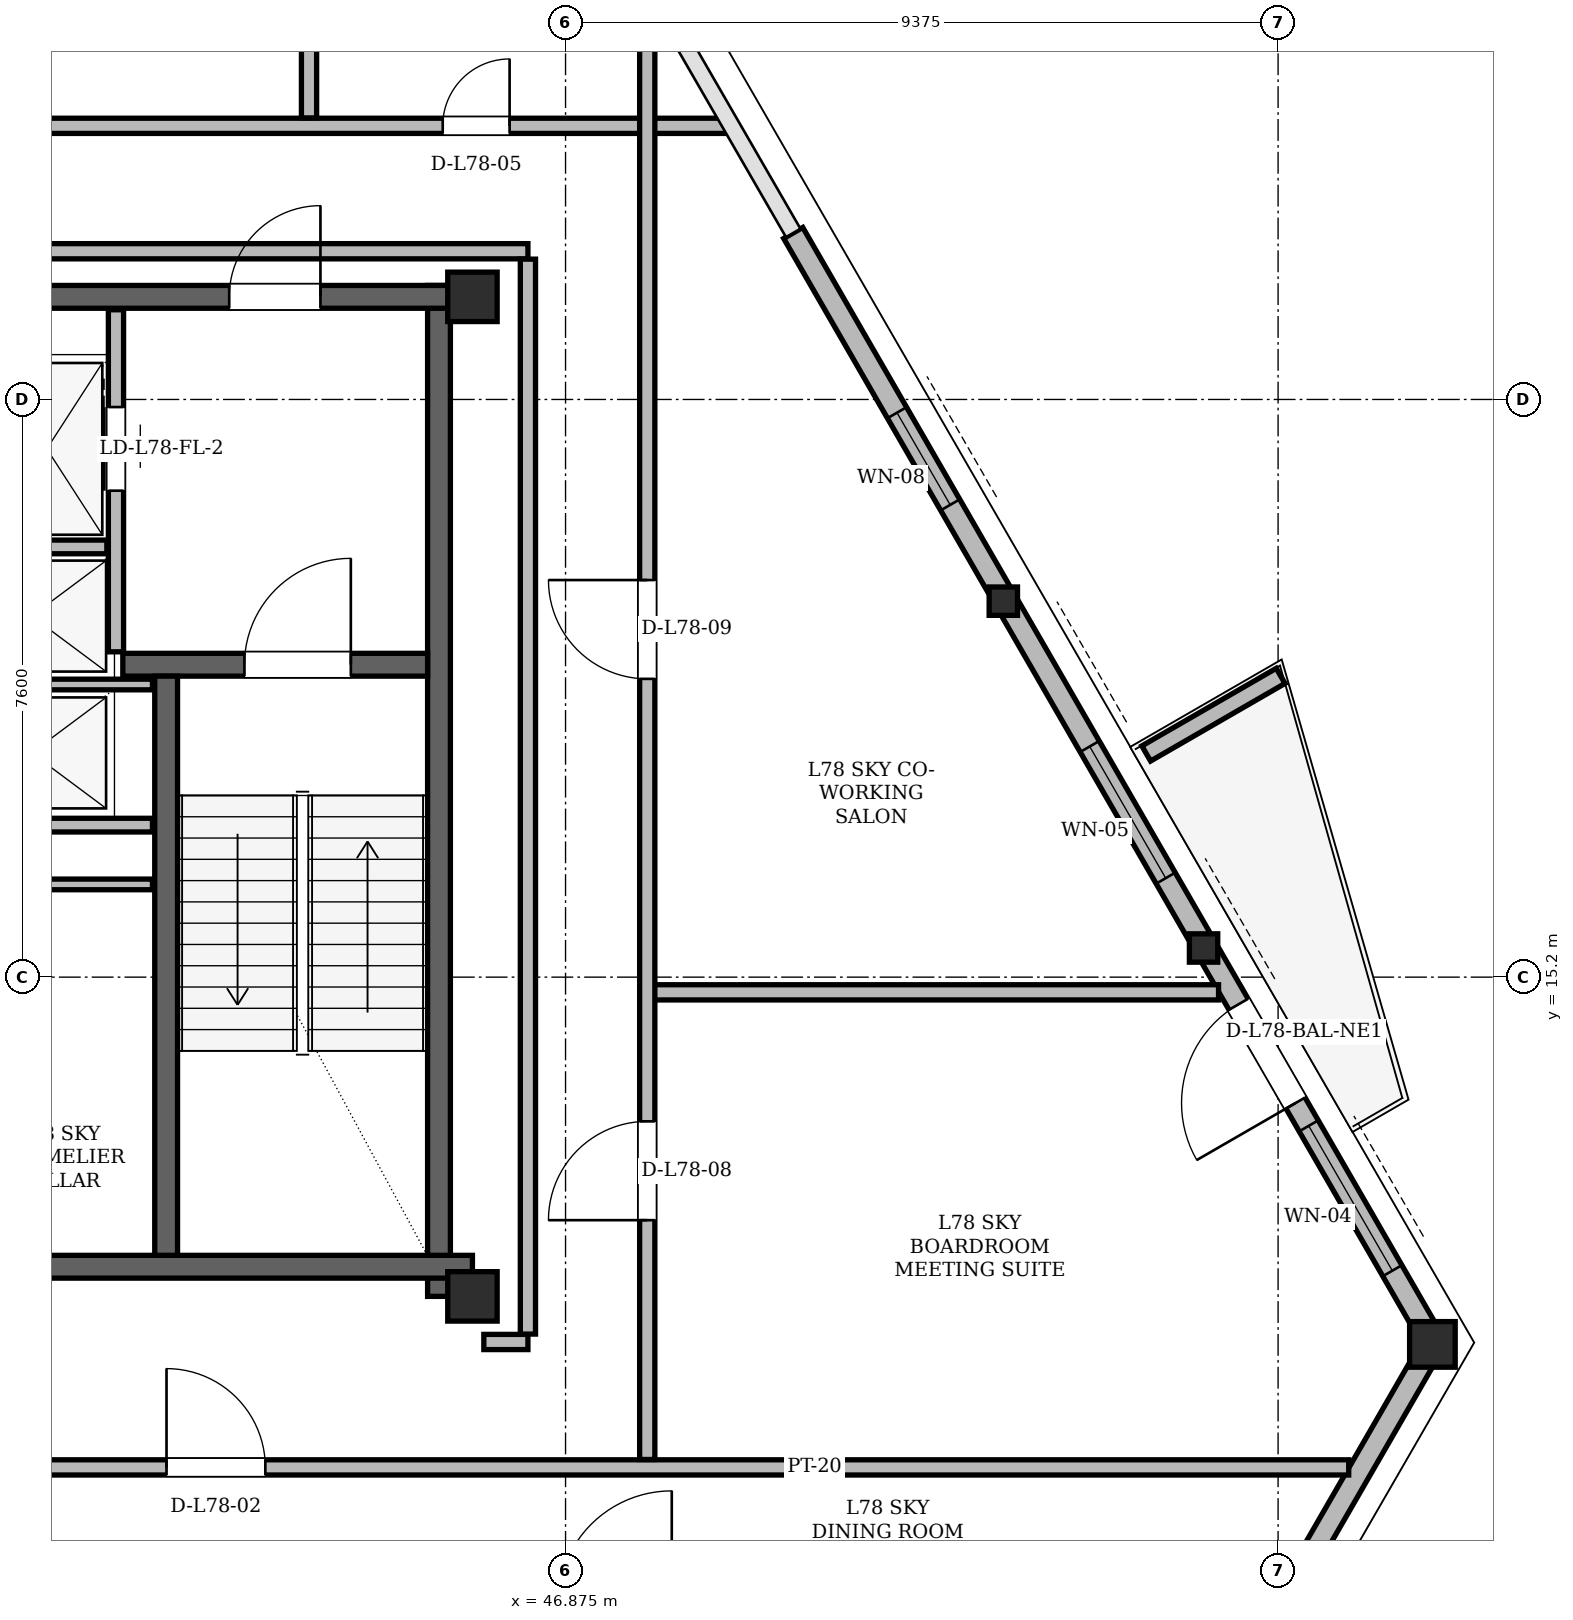
"""IFC4 building model, lengths in metres.
Left out: names, types, materials, properties, quantities, classifications, styles, units other than length and angle.
Written with IfcOpenShell. Run it as: python <this file> out.ifc"""

import sys

from ifc_helpers import new_model, si_unit, direction, frame, frame_2d, origin, origin_2d, place, context, subcontext, project, spatial, polyline, rectangle, hollow_rectangle, i_section, outline, extrude, element, fill, save


model = new_model("IFC4")
c1 = context("Model", 3, precision=1e-05, world=origin(), true_north=direction((0.0, 1.0)))
c2 = subcontext(c1, "Body", "Model", "MODEL_VIEW")
j1 = project(units=[si_unit("LENGTHUNIT", "METRE"), si_unit("PLANEANGLEUNIT", "RADIAN")], contexts=[c1])
p1 = place(None, origin())
s1 = spatial("IfcSite", under=j1, at=p1, CompositionType="ELEMENT")
p2 = place(p1, origin())
s2 = spatial("IfcBuilding", under=s1, at=p2, CompositionType="ELEMENT")
p3 = place(p2, frame((0.0, 0.0, 296.7)))
s3 = spatial("IfcBuildingStorey", under=s2, at=p3, CompositionType="ELEMENT", Elevation=296.7)
for number, where, z_axis, x_axis in (
    (1, (45.65, 11.0, 0.0), (0.0, 0.0, 1.0), (1.0, 0.0, 0.0)),
    (2, (45.65, 24.15, 0.0), (0.0, 0.0, 1.0), (1.0, 0.0, 0.0)),
):
    element("IfcColumn", number, at=place(p3, frame(where, z_axis=z_axis, x_axis=x_axis)), inside=s3, PredefinedType="COLUMN", context=c2, shape_type="SweptSolid", body=[
        extrude(hollow_rectangle(XDim=0.65, YDim=0.65, WallThickness=0.05, at=origin_2d()), origin(), (0.0, 0.0, 1.0), 4.5),
    ])
p4 = place(p3, frame((58.299, 10.392, 0.005), z_axis=(-0.008479798561, -0.010436675152, 0.999909580326), x_axis=(0.776114000116, -0.630592625094, 0.0)))
e3 = element("IfcColumn", 3, at=p4, inside=s3, PredefinedType="COLUMN", context=c2, shape_type="SweptSolid", body=[
    extrude(hollow_rectangle(XDim=0.6, YDim=0.6, WallThickness=0.045, at=origin_2d()), origin(), (0.0, 0.0, 1.0), 4.491),
])
p5 = place(p3, frame((55.29, 15.604, 0.005), z_axis=(-0.009186508362, -0.009132150324, 0.999916102428), x_axis=(0.705005437623, -0.709201898561, 0.0)))
e4 = element("IfcColumn", 4, at=p5, inside=s3, PredefinedType="COLUMN", context=c2, shape_type="SweptSolid", body=[
    extrude(i_section(OverallWidth=0.373, OverallDepth=0.373, WebThickness=0.016, FlangeThickness=0.026, at=origin_2d()), origin(), (0.0, 0.0, 1.0), 4.491),
])
p6 = place(p3, frame((52.657, 20.164, 0.005), z_axis=(-0.009893197126, -0.007936300991, 0.999919566654), x_axis=(0.625739826637, -0.780031838684, 0.0)))
e5 = element("IfcColumn", 5, at=p6, inside=s3, PredefinedType="COLUMN", context=c2, shape_type="SweptSolid", body=[
    extrude(i_section(OverallWidth=0.373, OverallDepth=0.373, WebThickness=0.016, FlangeThickness=0.026, at=origin_2d()), origin(), (0.0, 0.0, 1.0), 4.491),
])
p7 = place(p3, frame((45.21, 11.0, 0.0), z_axis=(0.0, 0.0, 1.0), x_axis=(0.0, 1.0, 0.0)))
e6 = element("IfcWall", 6, at=p7, inside=s3, PredefinedType="SHEAR", context=c2, shape_type="SweptSolid", body=[
    extrude(rectangle(XDim=13.3, YDim=0.3, at=frame_2d((6.65, 0.0))), origin(), (0.0, 0.0, 1.0), 4.28),
])
p8 = place(p3, frame((38.55, 11.39, 0.0), z_axis=(0.0, 0.0, 1.0), x_axis=(1.0, 0.0, 0.0)))
e7 = element("IfcWall", 7, at=p8, inside=s3, PredefinedType="SHEAR", context=c2, shape_type="SweptSolid", body=[
    extrude(rectangle(XDim=7.1, YDim=0.3, at=frame_2d((3.55, 0.0))), origin(), (0.0, 0.0, 1.0), 4.28),
])
p9 = place(p3, frame((29.65, 24.15, 0.0), z_axis=(0.0, 0.0, 1.0), x_axis=(1.0, 0.0, 0.0)))
e8 = element("IfcWall", 8, at=p9, inside=s3, PredefinedType="SHEAR", context=c2, shape_type="SweptSolid", body=[
    extrude(rectangle(XDim=15.7, YDim=0.3, at=frame_2d((7.85, 0.0))), origin(), (0.0, 0.0, 1.0), 4.28),
])
p10 = place(p9, frame((1.7, 0.0, 0.0)))
e9 = element("IfcOpeningElement", 9, at=p10, cuts=e8, PredefinedType="OPENING", context=c2, shape_type="SweptSolid", body=[
    extrude(rectangle(XDim=1.2, YDim=2.2, at=frame_2d((0.6, 1.1))), frame((0.0, 0.15, 0.0), z_axis=(0.0, -1.0, 0.0), x_axis=(1.0, 0.0, 0.0)), (0.0, 0.0, 1.0), 0.3),
])
p11 = place(p9, frame((12.8, 0.0, 0.0)))
e10 = element("IfcOpeningElement", 10, at=p11, cuts=e8, PredefinedType="OPENING", context=c2, shape_type="SweptSolid", body=[
    extrude(rectangle(XDim=1.2, YDim=2.2, at=frame_2d((0.6, 1.1))), frame((0.0, 0.15, 0.0), z_axis=(0.0, -1.0, 0.0), x_axis=(1.0, 0.0, 0.0)), (0.0, 0.0, 1.0), 0.3),
])
p12 = place(p9, frame((7.4, 0.0, 0.0)))
e11 = element("IfcOpeningElement", 11, at=p12, cuts=e8, PredefinedType="OPENING", context=c2, shape_type="SweptSolid", body=[
    extrude(rectangle(XDim=0.9, YDim=2.05, at=frame_2d((0.45, 1.025))), frame((0.0, 0.15, 0.0), z_axis=(0.0, -1.0, 0.0), x_axis=(1.0, 0.0, 0.0)), (0.0, 0.0, 1.0), 0.3),
])
p13 = place(p3, frame((41.05, 19.31, 0.0), z_axis=(0.0, 0.0, 1.0), x_axis=(1.0, 0.0, 0.0)))
e12 = element("IfcWall", 12, at=p13, inside=s3, PredefinedType="SHEAR", context=c2, shape_type="SweptSolid", body=[
    extrude(rectangle(XDim=4.01, YDim=0.3, at=frame_2d((2.005, 0.0))), origin(), (0.0, 0.0, 1.0), 4.28),
])
p14 = place(p13, frame((1.6, 0.0, 0.0)))
e13 = element("IfcOpeningElement", 13, at=p14, cuts=e12, PredefinedType="OPENING", context=c2, shape_type="SweptSolid", body=[
    extrude(rectangle(XDim=1.4, YDim=2.2, at=frame_2d((0.7, 1.1))), frame((0.0, 0.15, 0.0), z_axis=(0.0, -1.0, 0.0), x_axis=(1.0, 0.0, 0.0)), (0.0, 0.0, 1.0), 0.3),
])
p15 = place(p3, frame((41.62, 11.54, 0.0), z_axis=(0.0, 0.0, 1.0), x_axis=(0.0, 1.0, 0.0)))
e14 = element("IfcWall", 14, at=p15, inside=s3, PredefinedType="SHEAR", context=c2, shape_type="SweptSolid", body=[
    extrude(rectangle(XDim=7.62, YDim=0.3, at=frame_2d((3.81, 0.0))), origin(), (0.0, 0.0, 1.0), 4.28),
])
p16 = place(p3, frame((56.307, 6.941, 0.0), z_axis=(0.0, 0.0, 1.0), x_axis=(0.500014184414, 0.866017214255, 0.0)))
e15 = element("IfcWall", 15, at=p16, inside=s3, PredefinedType="SOLIDWALL", context=c2, shape_type="SweptSolid", body=[
    extrude(rectangle(XDim=3.984, YDim=0.29, at=frame_2d((1.992, 0.0))), origin(), (0.0, 0.0, 1.0), 3.658),
])
p17 = place(p3, frame((58.299, 10.392, 0.0), z_axis=(0.0, 0.0, 1.0), x_axis=(-0.500008291124, 0.866020616849, 0.0)))
e16 = element("IfcWall", 16, at=p17, inside=s3, PredefinedType="SOLIDWALL", context=c2, shape_type="SweptSolid", body=[
    extrude(rectangle(XDim=16.857, YDim=0.29, at=frame_2d((8.429, 0.0))), origin(), (0.0, 0.0, 1.0), 3.658),
])
p18 = place(p17, frame((3.639, 0.0, 0.0)))
e17 = element("IfcOpeningElement", 17, at=p18, cuts=e16, PredefinedType="OPENING", context=c2, shape_type="SweptSolid", body=[
    extrude(rectangle(XDim=1.5, YDim=2.2, at=frame_2d((0.75, 1.1))), frame((0.0, 0.145, 0.0), z_axis=(0.0, -1.0, 0.0), x_axis=(1.0, 0.0, 0.0)), (0.0, 0.0, 1.0), 0.29),
])
p19 = place(p17, frame((1.093, 0.0, 0.85)))
e18 = element("IfcOpeningElement", 18, at=p19, cuts=e16, PredefinedType="OPENING", context=c2, shape_type="SweptSolid", body=[
    extrude(rectangle(XDim=2.2, YDim=1.85, at=frame_2d((1.1, 0.925))), frame((0.0, 0.145, 0.0), z_axis=(0.0, -1.0, 0.0), x_axis=(1.0, 0.0, 0.0)), (0.0, 0.0, 1.0), 0.29),
])
p20 = place(p17, frame((7.056, 0.0, 0.85)))
e19 = element("IfcOpeningElement", 19, at=p20, cuts=e16, PredefinedType="OPENING", context=c2, shape_type="SweptSolid", body=[
    extrude(rectangle(XDim=2.0, YDim=1.8, at=frame_2d((1.0, 0.9))), frame((0.0, 0.145, 0.0), z_axis=(0.0, -1.0, 0.0), x_axis=(1.0, 0.0, 0.0)), (0.0, 0.0, 1.0), 0.29),
])
p21 = place(p17, frame((12.727, 0.0, 0.85)))
e20 = element("IfcOpeningElement", 20, at=p21, cuts=e16, PredefinedType="OPENING", context=c2, shape_type="SweptSolid", body=[
    extrude(rectangle(XDim=1.4, YDim=1.6, at=frame_2d((0.7, 0.8))), frame((0.0, 0.145, 0.0), z_axis=(0.0, -1.0, 0.0), x_axis=(1.0, 0.0, 0.0)), (0.0, 0.0, 1.0), 0.29),
])
p22 = place(p3, frame((54.515, 18.143, 0.0), z_axis=(0.0, 0.0, 1.0), x_axis=(0.866012356593, 0.500022597718, 0.0)))
e21 = element("IfcWall", 21, at=p22, inside=s3, PredefinedType="PARAPET", context=c2, shape_type="SweptSolid", body=[
    extrude(outline(polyline([(0.0, 0.0), (2.042, 0.0), (2.042, 1.1), (0.0, 1.32), (0.0, 0.0)])), frame((0.0, 0.115, 0.0), z_axis=(0.0, -1.0, 0.0), x_axis=(1.0, 0.0, 0.0)), (0.0, 0.0, 1.0), 0.23),
])
p23 = place(p3, frame((40.96, 19.48, 0.0), z_axis=(0.0, 0.0, 1.0), x_axis=(0.0, 1.0, 0.0)))
e22 = element("IfcWall", 22, at=p23, inside=s3, PredefinedType="PARTITIONING", context=c2, shape_type="SweptSolid", body=[
    extrude(rectangle(XDim=4.5, YDim=0.2, at=frame_2d((2.25, 0.0))), origin(), (0.0, 0.0, 1.0), 4.28),
])
p24 = place(p23, frame((2.12, 0.0, 0.0)))
e23 = element("IfcOpeningElement", 23, at=p24, cuts=e22, PredefinedType="OPENING", context=c2, shape_type="SweptSolid", body=[
    extrude(rectangle(XDim=1.1, YDim=2.2, at=frame_2d((0.55, 1.1))), frame((0.0, 0.1, 0.0), z_axis=(0.0, -1.0, 0.0), x_axis=(1.0, 0.0, 0.0)), (0.0, 0.0, 1.0), 0.2),
])
p25 = place(p3, frame((39.26, 20.86, 0.0), z_axis=(0.0, 0.0, 1.0), x_axis=(1.0, 0.0, 0.0)))
e24 = element("IfcWall", 24, at=p25, inside=s3, PredefinedType="PARTITIONING", context=c2, shape_type="SweptSolid", body=[
    extrude(rectangle(XDim=1.58, YDim=0.18, at=frame_2d((0.79, 0.0))), origin(), (0.0, 0.0, 1.0), 4.28),
])
p26 = place(p3, frame((38.78, 17.2, 0.0), z_axis=(0.0, 0.0, 1.0), x_axis=(1.0, 0.0, 0.0)))
e25 = element("IfcWall", 25, at=p26, inside=s3, PredefinedType="PARTITIONING", context=c2, shape_type="SweptSolid", body=[
    extrude(rectangle(XDim=2.66, YDim=0.18, at=frame_2d((1.33, 0.0))), origin(), (0.0, 0.0, 1.0), 4.28),
])
for number, where, z_axis, x_axis in (
    (26, (38.78, 19.05, 0.0), (0.0, 0.0, 1.0), (1.0, 0.0, 0.0)),
    (27, (38.78, 16.42, 0.0), (0.0, 0.0, 1.0), (1.0, 0.0, 0.0)),
):
    element("IfcWall", number, at=place(p3, frame(where, z_axis=z_axis, x_axis=x_axis)), inside=s3, PredefinedType="PARTITIONING", context=c2, shape_type="SweptSolid", body=[
        extrude(rectangle(XDim=2.66, YDim=0.14, at=frame_2d((1.33, 0.0))), origin(), (0.0, 0.0, 1.0), 4.28),
    ])
p27 = place(p3, frame((17.821, 8.75, 0.0), z_axis=(0.0, 0.0, 1.0), x_axis=(1.0, 0.0, 0.0)))
e28 = element("IfcWall", 28, at=p27, inside=s3, PredefinedType="PARTITIONING", context=c2, shape_type="SweptSolid", body=[
    extrude(rectangle(XDim=39.358, YDim=0.2, at=frame_2d((19.679, 0.0))), origin(), (0.0, 0.0, 1.0), 3.866),
])
p28 = place(p27, frame((13.555, 0.0, 0.0)))
e29 = element("IfcOpeningElement", 29, at=p28, cuts=e28, PredefinedType="OPENING", context=c2, shape_type="SweptSolid", body=[
    extrude(rectangle(XDim=1.3, YDim=2.2, at=frame_2d((0.65, 1.1))), frame((0.0, 0.1, 0.0), z_axis=(0.0, -1.0, 0.0), x_axis=(1.0, 0.0, 0.0)), (0.0, 0.0, 1.0), 0.2),
])
p29 = place(p27, frame((23.804, 0.0, 0.0)))
e30 = element("IfcOpeningElement", 30, at=p29, cuts=e28, PredefinedType="OPENING", context=c2, shape_type="SweptSolid", body=[
    extrude(rectangle(XDim=1.3, YDim=2.2, at=frame_2d((0.65, 1.1))), frame((0.0, 0.1, 0.0), z_axis=(0.0, -1.0, 0.0), x_axis=(1.0, 0.0, 0.0)), (0.0, 0.0, 1.0), 0.2),
])
p30 = place(p3, frame((45.8, 10.4, 0.0), z_axis=(0.0, 0.0, 1.0), x_axis=(1.0, 0.0, 0.0)))
e31 = element("IfcWall", 31, at=p30, inside=s3, PredefinedType="PARTITIONING", context=c2, shape_type="SweptSolid", body=[
    extrude(rectangle(XDim=0.58, YDim=0.2, at=frame_2d((0.29, 0.0))), origin(), (0.0, 0.0, 1.0), 4.28),
])
p31 = place(p3, frame((47.95, 15.0, 0.0), z_axis=(0.0, 0.0, 1.0), x_axis=(1.0, 0.0, 0.0)))
e32 = element("IfcWall", 32, at=p31, inside=s3, PredefinedType="PARTITIONING", context=c2, shape_type="SweptSolid", body=[
    extrude(rectangle(XDim=7.517, YDim=0.2, at=frame_2d((3.758, 0.0))), origin(), (0.0, 0.0, 1.0), 4.28),
])
p32 = place(p3, frame((28.62, 24.75, 0.0), z_axis=(0.0, 0.0, 1.0), x_axis=(1.0, 0.0, 0.0)))
e33 = element("IfcWall", 33, at=p32, inside=s3, PredefinedType="PARTITIONING", context=c2, shape_type="SweptSolid", body=[
    extrude(rectangle(XDim=17.76, YDim=0.2, at=frame_2d((8.88, 0.0))), origin(), (0.0, 0.0, 1.0), 3.866),
])
p33 = place(p3, frame((26.007, 26.4, 0.0), z_axis=(0.0, 0.0, 1.0), x_axis=(1.0, 0.0, 0.0)))
e34 = element("IfcWall", 34, at=p33, inside=s3, PredefinedType="PARTITIONING", context=c2, shape_type="SweptSolid", body=[
    extrude(rectangle(XDim=22.987, YDim=0.2, at=frame_2d((11.493, 0.0))), origin(), (0.0, 0.0, 1.0), 3.658),
])
p34 = place(p33, frame((3.132, 0.0, 0.0)))
e35 = element("IfcOpeningElement", 35, at=p34, cuts=e34, PredefinedType="OPENING", context=c2, shape_type="SweptSolid", body=[
    extrude(rectangle(XDim=0.88, YDim=2.08, at=frame_2d((0.44, 1.04))), frame((0.0, 0.1, 0.0), z_axis=(0.0, -1.0, 0.0), x_axis=(1.0, 0.0, 0.0)), (0.0, 0.0, 1.0), 0.2),
])
p35 = place(p33, frame((11.342, 0.0, 0.0)))
e36 = element("IfcOpeningElement", 36, at=p35, cuts=e34, PredefinedType="OPENING", context=c2, shape_type="SweptSolid", body=[
    extrude(rectangle(XDim=1.3, YDim=2.2, at=frame_2d((0.65, 1.1))), frame((0.0, 0.1, 0.0), z_axis=(0.0, -1.0, 0.0), x_axis=(1.0, 0.0, 0.0)), (0.0, 0.0, 1.0), 0.2),
])
p36 = place(p33, frame((19.252, 0.0, 0.0)))
e37 = element("IfcOpeningElement", 37, at=p36, cuts=e34, PredefinedType="OPENING", context=c2, shape_type="SweptSolid", body=[
    extrude(rectangle(XDim=0.88, YDim=2.08, at=frame_2d((0.44, 1.04))), frame((0.0, 0.1, 0.0), z_axis=(0.0, -1.0, 0.0), x_axis=(1.0, 0.0, 0.0)), (0.0, 0.0, 1.0), 0.2),
])
p37 = place(p3, frame((43.5, 26.504, 0.0), z_axis=(0.0, 0.0, 1.0), x_axis=(0.0, 1.0, 0.0)))
e38 = element("IfcWall", 38, at=p37, inside=s3, PredefinedType="PARTITIONING", context=c2, shape_type="SweptSolid", body=[
    extrude(rectangle(XDim=3.592, YDim=0.2, at=frame_2d((1.796, 0.0))), origin(), (0.0, 0.0, 1.0), 4.28),
])
p38 = place(p3, frame((46.38, 10.504, 0.0), z_axis=(0.0, 0.0, 1.0), x_axis=(0.0, 1.0, 0.0)))
e39 = element("IfcWall", 39, at=p38, inside=s3, PredefinedType="PARTITIONING", context=c2, shape_type="SweptSolid", body=[
    extrude(rectangle(XDim=14.142, YDim=0.2, at=frame_2d((7.071, 0.0))), origin(), (0.0, 0.0, 1.0), 3.866),
])
p39 = place(p3, frame((47.95, 8.854, 0.0), z_axis=(0.0, 0.0, 1.0), x_axis=(0.0, 1.0, 0.0)))
e40 = element("IfcWall", 40, at=p39, inside=s3, PredefinedType="PARTITIONING", context=c2, shape_type="SweptSolid", body=[
    extrude(rectangle(XDim=19.303, YDim=0.2, at=frame_2d((9.652, 0.0))), origin(), (0.0, 0.0, 1.0), 3.658),
])
p40 = place(p39, frame((3.149, 0.0, 0.0)))
e41 = element("IfcOpeningElement", 41, at=p40, cuts=e40, PredefinedType="OPENING", context=c2, shape_type="SweptSolid", body=[
    extrude(rectangle(XDim=1.3, YDim=2.2, at=frame_2d((0.65, 1.1))), frame((0.0, 0.1, 0.0), z_axis=(0.0, -1.0, 0.0), x_axis=(1.0, 0.0, 0.0)), (0.0, 0.0, 1.0), 0.2),
])
p41 = place(p39, frame((10.27, 0.0, 0.0)))
e42 = element("IfcOpeningElement", 42, at=p41, cuts=e40, PredefinedType="OPENING", context=c2, shape_type="SweptSolid", body=[
    extrude(rectangle(XDim=1.3, YDim=2.2, at=frame_2d((0.65, 1.1))), frame((0.0, 0.1, 0.0), z_axis=(0.0, -1.0, 0.0), x_axis=(1.0, 0.0, 0.0)), (0.0, 0.0, 1.0), 0.2),
])
p42 = place(p18, origin())
e43 = element("IfcDoor", 43, at=p42, inside=s3, OperationType="SINGLE_SWING_LEFT", PredefinedType="DOOR", context=c2, shape_type="SweptSolid", body=[
    extrude(rectangle(XDim=1.5, YDim=2.2, at=frame_2d((0.75, 1.1))), frame((0.0, 0.025, 0.0), z_axis=(0.0, -1.0, 0.0), x_axis=(1.0, 0.0, 0.0)), (0.0, 0.0, 1.0), 0.05),
])
fill(e17, e43)
p43 = place(p19, origin())
e44 = element("IfcWindow", 44, at=p43, inside=s3, PartitioningType="SINGLE_PANEL", PredefinedType="WINDOW", context=c2, shape_type="SweptSolid", body=[
    extrude(rectangle(XDim=2.2, YDim=1.85, at=frame_2d((1.1, 0.925))), frame((0.0, 0.03, 0.0), z_axis=(0.0, -1.0, 0.0), x_axis=(1.0, 0.0, 0.0)), (0.0, 0.0, 1.0), 0.06),
])
fill(e18, e44)
p44 = place(p20, origin())
e45 = element("IfcWindow", 45, at=p44, inside=s3, PartitioningType="SINGLE_PANEL", PredefinedType="WINDOW", context=c2, shape_type="SweptSolid", body=[
    extrude(rectangle(XDim=2.0, YDim=1.8, at=frame_2d((1.0, 0.9))), frame((0.0, 0.03, 0.0), z_axis=(0.0, -1.0, 0.0), x_axis=(1.0, 0.0, 0.0)), (0.0, 0.0, 1.0), 0.06),
])
fill(e19, e45)
p45 = place(p21, origin())
e46 = element("IfcWindow", 46, at=p45, inside=s3, PartitioningType="SINGLE_PANEL", PredefinedType="WINDOW", context=c2, shape_type="SweptSolid", body=[
    extrude(rectangle(XDim=1.4, YDim=1.6, at=frame_2d((0.7, 0.8))), frame((0.0, 0.03, 0.0), z_axis=(0.0, -1.0, 0.0), x_axis=(1.0, 0.0, 0.0)), (0.0, 0.0, 1.0), 0.06),
])
fill(e20, e46)
p46 = place(p24, origin())
e47 = element("IfcDoor", 47, at=p46, inside=s3, OperationType="SLIDING_TO_RIGHT", PredefinedType="DOOR", context=c2, shape_type="SweptSolid", body=[
    extrude(rectangle(XDim=1.1, YDim=2.2, at=frame_2d((0.55, 1.1))), frame((0.0, 0.025, 0.0), z_axis=(0.0, -1.0, 0.0), x_axis=(1.0, 0.0, 0.0)), (0.0, 0.0, 1.0), 0.05),
])
fill(e23, e47)
p47 = place(p14, origin())
e48 = element("IfcDoor", 48, at=p47, inside=s3, OperationType="SINGLE_SWING_RIGHT", PredefinedType="DOOR", context=c2, shape_type="SweptSolid", body=[
    extrude(rectangle(XDim=1.4, YDim=2.2, at=frame_2d((0.7, 1.1))), frame((0.0, 0.025, 0.0), z_axis=(0.0, -1.0, 0.0), x_axis=(1.0, 0.0, 0.0)), (0.0, 0.0, 1.0), 0.05),
])
fill(e13, e48)
p48 = place(p11, origin())
e49 = element("IfcDoor", 49, at=p48, inside=s3, OperationType="SINGLE_SWING_RIGHT", PredefinedType="DOOR", context=c2, shape_type="SweptSolid", body=[
    extrude(rectangle(XDim=1.2, YDim=2.2, at=frame_2d((0.6, 1.1))), frame((0.0, 0.025, 0.0), z_axis=(0.0, -1.0, 0.0), x_axis=(1.0, 0.0, 0.0)), (0.0, 0.0, 1.0), 0.05),
])
fill(e10, e49)
p49 = place(p29, origin())
e50 = element("IfcDoor", 50, at=p49, inside=s3, OperationType="SINGLE_SWING_LEFT", PredefinedType="DOOR", context=c2, shape_type="SweptSolid", body=[
    extrude(rectangle(XDim=1.3, YDim=2.2, at=frame_2d((0.65, 1.1))), frame((0.0, 0.025, 0.0), z_axis=(0.0, -1.0, 0.0), x_axis=(1.0, 0.0, 0.0)), (0.0, 0.0, 1.0), 0.05),
])
fill(e30, e50)
p50 = place(p36, origin())
e51 = element("IfcDoor", 51, at=p50, inside=s3, OperationType="SINGLE_SWING_RIGHT", PredefinedType="DOOR", context=c2, shape_type="SweptSolid", body=[
    extrude(rectangle(XDim=0.88, YDim=2.08, at=frame_2d((0.44, 1.04))), frame((0.0, 0.025, 0.0), z_axis=(0.0, -1.0, 0.0), x_axis=(1.0, 0.0, 0.0)), (0.0, 0.0, 1.0), 0.05),
])
fill(e37, e51)
p51 = place(p40, origin())
e52 = element("IfcDoor", 52, at=p51, inside=s3, OperationType="SINGLE_SWING_LEFT", PredefinedType="DOOR", context=c2, shape_type="SweptSolid", body=[
    extrude(rectangle(XDim=1.3, YDim=2.2, at=frame_2d((0.65, 1.1))), frame((0.0, 0.025, 0.0), z_axis=(0.0, -1.0, 0.0), x_axis=(1.0, 0.0, 0.0)), (0.0, 0.0, 1.0), 0.05),
])
fill(e41, e52)
p52 = place(p41, origin())
e53 = element("IfcDoor", 53, at=p52, inside=s3, OperationType="SINGLE_SWING_RIGHT", PredefinedType="DOOR", context=c2, shape_type="SweptSolid", body=[
    extrude(rectangle(XDim=1.3, YDim=2.2, at=frame_2d((0.65, 1.1))), frame((0.0, 0.025, 0.0), z_axis=(0.0, -1.0, 0.0), x_axis=(1.0, 0.0, 0.0)), (0.0, 0.0, 1.0), 0.05),
])
fill(e42, e53)
save(model, sys.argv[1])
